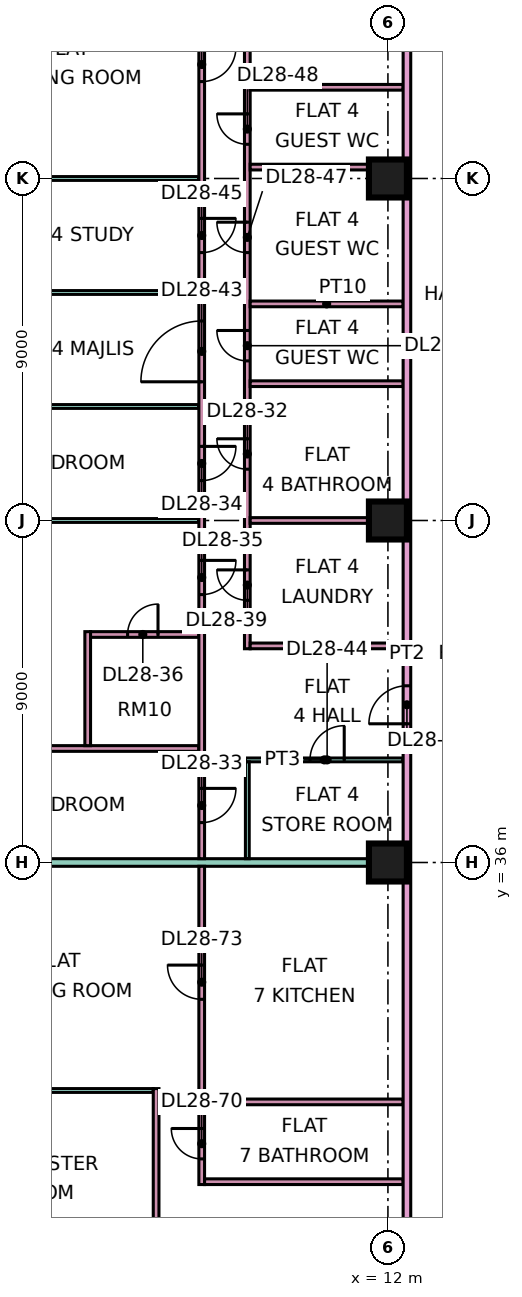
"""IFC4 building model, lengths in metres.
Left out: names, types, materials, properties, quantities, classifications, styles, units other than length and angle.
Written with IfcOpenShell. Run it as: python <this file> out.ifc"""

import sys

from ifc_helpers import new_model, si_unit, direction, frame, frame_2d, origin, origin_2d, place, context, subcontext, project, spatial, rectangle, extrude, element, fill, save


model = new_model("IFC4")
c1 = context("Model", 3, precision=1e-05, world=origin(), true_north=direction((0.0, 1.0)))
c2 = subcontext(c1, "Body", "Model", "MODEL_VIEW")
j1 = project(units=[si_unit("LENGTHUNIT", "METRE"), si_unit("PLANEANGLEUNIT", "RADIAN")], contexts=[c1])
p1 = place(None, origin())
s1 = spatial("IfcSite", under=j1, at=p1, CompositionType="ELEMENT")
p2 = place(p1, origin())
s2 = spatial("IfcBuilding", under=s1, at=p2, CompositionType="ELEMENT")
p3 = place(p2, frame((0.0, 0.0, 121.9)))
s3 = spatial("IfcBuildingStorey", under=s2, at=p3, CompositionType="ELEMENT", Elevation=121.9)
for number, where, z_axis, x_axis in (
    (1, (12.0, 36.0, 0.0), (0.0, 0.0, 1.0), (1.0, 0.0, 0.0)),
    (2, (12.0, 45.0, 0.0), (0.0, 0.0, 1.0), (1.0, 0.0, 0.0)),
    (3, (12.0, 54.0, 0.0), (0.0, 0.0, 1.0), (1.0, 0.0, 0.0)),
):
    element("IfcColumn", number, at=place(p3, frame(where, z_axis=z_axis, x_axis=x_axis)), inside=s3, PredefinedType="COLUMN", context=c2, shape_type="SweptSolid", body=[
        extrude(rectangle(XDim=1.0, YDim=1.0, at=origin_2d()), origin(), (0.0, 0.0, 1.0), 3.75),
    ])
p4 = place(p3, frame((-1.351, 39.0, 0.0), z_axis=(0.0, 0.0, 1.0), x_axis=(1.0, 0.0, 0.0)))
e4 = element("IfcWall", 4, at=p4, inside=s3, PredefinedType="PARTITIONING", context=c2, shape_type="SweptSolid", body=[
    extrude(rectangle(XDim=8.376, YDim=0.15, at=frame_2d((4.188, 0.0))), origin(), (0.0, 0.0, 1.0), 3.35),
])
p5 = place(p3, frame((-1.351, 45.0, 0.0), z_axis=(0.0, 0.0, 1.0), x_axis=(1.0, 0.0, 0.0)))
e5 = element("IfcWall", 5, at=p5, inside=s3, PredefinedType="PARTITIONING", context=c2, shape_type="SweptSolid", body=[
    extrude(rectangle(XDim=8.376, YDim=0.1, at=frame_2d((4.188, 0.0))), origin(), (0.0, 0.0, 1.0), 3.35),
])
p6 = place(p3, frame((0.0, 36.0, 0.0), z_axis=(0.0, 0.0, 1.0), x_axis=(1.0, 0.0, 0.0)))
e6 = element("IfcWall", 6, at=p6, inside=s3, PredefinedType="PARTITIONING", context=c2, shape_type="SweptSolid", body=[
    extrude(rectangle(XDim=12.4, YDim=0.2, at=frame_2d((6.2, 0.0))), origin(), (0.0, 0.0, 1.0), 3.35),
])
p7 = place(p3, frame((0.0, 48.0, 0.0), z_axis=(0.0, 0.0, 1.0), x_axis=(1.0, 0.0, 0.0)))
e7 = element("IfcWall", 7, at=p7, inside=s3, PredefinedType="PARTITIONING", context=c2, shape_type="SweptSolid", body=[
    extrude(rectangle(XDim=7.025, YDim=0.1, at=frame_2d((3.512, 0.0))), origin(), (0.0, 0.0, 1.0), 3.35),
])
p8 = place(p3, frame((0.074, 30.0, 0.0), z_axis=(0.0, 0.0, 1.0), x_axis=(1.0, 0.0, 0.0)))
e8 = element("IfcWall", 8, at=p8, inside=s3, PredefinedType="PARTITIONING", context=c2, shape_type="SweptSolid", body=[
    extrude(rectangle(XDim=5.751, YDim=0.1, at=frame_2d((2.875, 0.0))), origin(), (0.0, 0.0, 1.0), 3.35),
])
p9 = place(p8, frame((1.126, 0.0, 0.0)))
e9 = element("IfcOpeningElement", 9, at=p9, cuts=e8, PredefinedType="OPENING", context=c2, shape_type="SweptSolid", body=[
    extrude(rectangle(XDim=0.9, YDim=2.1, at=frame_2d((0.45, 1.05))), frame((0.0, 0.06, 0.0), z_axis=(0.0, -1.0, 0.0), x_axis=(1.0, 0.0, 0.0)), (0.0, 0.0, 1.0), 0.12),
])
for number, where, z_axis, x_axis in (
    (10, (0.074, 51.0, 0.0), (0.0, 0.0, 1.0), (1.0, 0.0, 0.0)),
    (11, (0.074, 54.0, 0.0), (0.0, 0.0, 1.0), (1.0, 0.0, 0.0)),
):
    element("IfcWall", number, at=place(p3, frame(where, z_axis=z_axis, x_axis=x_axis)), inside=s3, PredefinedType="PARTITIONING", context=c2, shape_type="SweptSolid", body=[
        extrude(rectangle(XDim=6.951, YDim=0.1, at=frame_2d((3.476, 0.0))), origin(), (0.0, 0.0, 1.0), 3.35),
    ])
p10 = place(p3, frame((4.1, 39.075, 0.0), z_axis=(0.0, 0.0, 1.0), x_axis=(0.0, 1.0, 0.0)))
e12 = element("IfcWall", 12, at=p10, inside=s3, PredefinedType="PARTITIONING", context=c2, shape_type="SweptSolid", body=[
    extrude(rectangle(XDim=3.0, YDim=0.15, at=frame_2d((1.5, 0.0))), origin(), (0.0, 0.0, 1.0), 3.35),
])
p11 = place(p3, frame((4.175, 42.0, 0.0), z_axis=(0.0, 0.0, 1.0), x_axis=(1.0, 0.0, 0.0)))
e13 = element("IfcWall", 13, at=p11, inside=s3, PredefinedType="PARTITIONING", context=c2, shape_type="SweptSolid", body=[
    extrude(rectangle(XDim=2.85, YDim=0.15, at=frame_2d((1.425, 0.0))), origin(), (0.0, 0.0, 1.0), 3.35),
])
p12 = place(p11, frame((0.975, 0.0, 0.0)))
e14 = element("IfcOpeningElement", 14, at=p12, cuts=e13, PredefinedType="OPENING", context=c2, shape_type="SweptSolid", body=[
    extrude(rectangle(XDim=0.8, YDim=2.1, at=frame_2d((0.4, 1.05))), frame((0.0, 0.085, 0.0), z_axis=(0.0, -1.0, 0.0), x_axis=(1.0, 0.0, 0.0)), (0.0, 0.0, 1.0), 0.17),
])
p13 = place(p3, frame((5.9, 22.5, 0.0), z_axis=(0.0, 0.0, 1.0), x_axis=(0.0, 1.0, 0.0)))
e15 = element("IfcWall", 15, at=p13, inside=s3, PredefinedType="PARTITIONING", context=c2, shape_type="SweptSolid", body=[
    extrude(rectangle(XDim=7.55, YDim=0.15, at=frame_2d((3.775, 0.0))), origin(), (0.0, 0.0, 1.0), 3.35),
])
p14 = place(p3, frame((7.1, 27.525, 0.0), z_axis=(0.0, 0.0, 1.0), x_axis=(0.0, 1.0, 0.0)))
e16 = element("IfcWall", 16, at=p14, inside=s3, PredefinedType="PARTITIONING", context=c2, shape_type="SweptSolid", body=[
    extrude(rectangle(XDim=8.375, YDim=0.15, at=frame_2d((4.188, 0.0))), origin(), (0.0, 0.0, 1.0), 3.35),
])
p15 = place(p14, frame((0.675, 0.0, 0.0)))
e17 = element("IfcOpeningElement", 17, at=p15, cuts=e16, PredefinedType="OPENING", context=c2, shape_type="SweptSolid", body=[
    extrude(rectangle(XDim=0.8, YDim=2.1, at=frame_2d((0.4, 1.05))), frame((0.0, 0.085, 0.0), z_axis=(0.0, -1.0, 0.0), x_axis=(1.0, 0.0, 0.0)), (0.0, 0.0, 1.0), 0.17),
])
p16 = place(p14, frame((4.875, 0.0, 0.0)))
e18 = element("IfcOpeningElement", 18, at=p16, cuts=e16, PredefinedType="OPENING", context=c2, shape_type="SweptSolid", body=[
    extrude(rectangle(XDim=0.9, YDim=2.1, at=frame_2d((0.45, 1.05))), frame((0.0, 0.085, 0.0), z_axis=(0.0, -1.0, 0.0), x_axis=(1.0, 0.0, 0.0)), (0.0, 0.0, 1.0), 0.17),
])
p17 = place(p3, frame((7.1, 36.1, 0.0), z_axis=(0.0, 0.0, 1.0), x_axis=(0.0, 1.0, 0.0)))
e19 = element("IfcWall", 19, at=p17, inside=s3, PredefinedType="PARTITIONING", context=c2, shape_type="SweptSolid", body=[
    extrude(rectangle(XDim=26.826, YDim=0.15, at=frame_2d((13.413, 0.0))), origin(), (0.0, 0.0, 1.0), 3.35),
])
p18 = place(p17, frame((0.95, 0.0, 0.0)))
e20 = element("IfcOpeningElement", 20, at=p18, cuts=e19, PredefinedType="OPENING", context=c2, shape_type="SweptSolid", body=[
    extrude(rectangle(XDim=0.9, YDim=2.1, at=frame_2d((0.45, 1.05))), frame((0.0, 0.085, 0.0), z_axis=(0.0, -1.0, 0.0), x_axis=(1.0, 0.0, 0.0)), (0.0, 0.0, 1.0), 0.17),
])
p19 = place(p17, frame((9.95, 0.0, 0.0)))
e21 = element("IfcOpeningElement", 21, at=p19, cuts=e19, PredefinedType="OPENING", context=c2, shape_type="SweptSolid", body=[
    extrude(rectangle(XDim=0.9, YDim=2.1, at=frame_2d((0.45, 1.05))), frame((0.0, 0.085, 0.0), z_axis=(0.0, -1.0, 0.0), x_axis=(1.0, 0.0, 0.0)), (0.0, 0.0, 1.0), 0.17),
])
p20 = place(p17, frame((6.95, 0.0, 0.0)))
e22 = element("IfcOpeningElement", 22, at=p20, cuts=e19, PredefinedType="OPENING", context=c2, shape_type="SweptSolid", body=[
    extrude(rectangle(XDim=0.9, YDim=2.1, at=frame_2d((0.45, 1.05))), frame((0.0, 0.085, 0.0), z_axis=(0.0, -1.0, 0.0), x_axis=(1.0, 0.0, 0.0)), (0.0, 0.0, 1.0), 0.17),
])
p21 = place(p17, frame((20.45, 0.0, 0.0)))
e23 = element("IfcOpeningElement", 23, at=p21, cuts=e19, PredefinedType="OPENING", context=c2, shape_type="SweptSolid", body=[
    extrude(rectangle(XDim=0.9, YDim=2.1, at=frame_2d((0.45, 1.05))), frame((0.0, 0.085, 0.0), z_axis=(0.0, -1.0, 0.0), x_axis=(1.0, 0.0, 0.0)), (0.0, 0.0, 1.0), 0.17),
])
p22 = place(p17, frame((25.8, 0.0, 0.0)))
e24 = element("IfcOpeningElement", 24, at=p22, cuts=e19, PredefinedType="OPENING", context=c2, shape_type="SweptSolid", body=[
    extrude(rectangle(XDim=0.8, YDim=2.1, at=frame_2d((0.4, 1.05))), frame((0.0, 0.085, 0.0), z_axis=(0.0, -1.0, 0.0), x_axis=(1.0, 0.0, 0.0)), (0.0, 0.0, 1.0), 0.17),
])
p23 = place(p17, frame((12.55, 0.0, 0.0)))
e25 = element("IfcOpeningElement", 25, at=p23, cuts=e19, PredefinedType="OPENING", context=c2, shape_type="SweptSolid", body=[
    extrude(rectangle(XDim=1.6, YDim=2.1, at=frame_2d((0.8, 1.05))), frame((0.0, 0.085, 0.0), z_axis=(0.0, -1.0, 0.0), x_axis=(1.0, 0.0, 0.0)), (0.0, 0.0, 1.0), 0.17),
])
p24 = place(p17, frame((15.95, 0.0, 0.0)))
e26 = element("IfcOpeningElement", 26, at=p24, cuts=e19, PredefinedType="OPENING", context=c2, shape_type="SweptSolid", body=[
    extrude(rectangle(XDim=0.9, YDim=2.1, at=frame_2d((0.45, 1.05))), frame((0.0, 0.085, 0.0), z_axis=(0.0, -1.0, 0.0), x_axis=(1.0, 0.0, 0.0)), (0.0, 0.0, 1.0), 0.17),
])
for number, where, z_axis, x_axis in (
    (27, (7.175, 27.6, 0.0), (0.0, 0.0, 1.0), (1.0, 0.0, 0.0)),
    (28, (7.175, 29.7, 0.0), (0.0, 0.0, 1.0), (1.0, 0.0, 0.0)),
):
    element("IfcWall", number, at=place(p3, frame(where, z_axis=z_axis, x_axis=x_axis)), inside=s3, PredefinedType="PARTITIONING", context=c2, shape_type="SweptSolid", body=[
        extrude(rectangle(XDim=5.225, YDim=0.15, at=frame_2d((2.612, 0.0))), origin(), (0.0, 0.0, 1.0), 3.35),
    ])
p25 = place(p3, frame((8.25, 38.7, 0.0), z_axis=(0.0, 0.0, 1.0), x_axis=(1.0, 0.0, 0.0)))
e29 = element("IfcWall", 29, at=p25, inside=s3, PredefinedType="PARTITIONING", context=c2, shape_type="SweptSolid", body=[
    extrude(rectangle(XDim=4.15, YDim=0.1, at=frame_2d((2.075, 0.0))), origin(), (0.0, 0.0, 1.0), 3.35),
])
p26 = place(p25, frame((1.7, 0.0, 0.0)))
e30 = element("IfcOpeningElement", 30, at=p26, cuts=e29, PredefinedType="OPENING", context=c2, shape_type="SweptSolid", body=[
    extrude(rectangle(XDim=0.9, YDim=2.1, at=frame_2d((0.45, 1.05))), frame((0.0, 0.06, 0.0), z_axis=(0.0, -1.0, 0.0), x_axis=(1.0, 0.0, 0.0)), (0.0, 0.0, 1.0), 0.12),
])
p27 = place(p3, frame((8.3, 36.1, 0.0), z_axis=(0.0, 0.0, 1.0), x_axis=(0.0, 1.0, 0.0)))
e31 = element("IfcWall", 31, at=p27, inside=s3, PredefinedType="PARTITIONING", context=c2, shape_type="SweptSolid", body=[
    extrude(rectangle(XDim=2.55, YDim=0.1, at=frame_2d((1.275, 0.0))), origin(), (0.0, 0.0, 1.0), 3.35),
])
p28 = place(p3, frame((8.3, 41.625, 0.0), z_axis=(0.0, 0.0, 1.0), x_axis=(0.0, 1.0, 0.0)))
e32 = element("IfcWall", 32, at=p28, inside=s3, PredefinedType="PARTITIONING", context=c2, shape_type="SweptSolid", body=[
    extrude(rectangle(XDim=21.301, YDim=0.15, at=frame_2d((10.65, 0.0))), origin(), (0.0, 0.0, 1.0), 3.35),
])
p29 = place(p28, frame((4.725, 0.0, 0.0)))
e33 = element("IfcOpeningElement", 33, at=p29, cuts=e32, PredefinedType="OPENING", context=c2, shape_type="SweptSolid", body=[
    extrude(rectangle(XDim=0.8, YDim=2.1, at=frame_2d((0.4, 1.05))), frame((0.0, 0.085, 0.0), z_axis=(0.0, -1.0, 0.0), x_axis=(1.0, 0.0, 0.0)), (0.0, 0.0, 1.0), 0.17),
])
p30 = place(p28, frame((17.625, 0.0, 0.0)))
e34 = element("IfcOpeningElement", 34, at=p30, cuts=e32, PredefinedType="OPENING", context=c2, shape_type="SweptSolid", body=[
    extrude(rectangle(XDim=0.9, YDim=2.1, at=frame_2d((0.45, 1.05))), frame((0.0, 0.085, 0.0), z_axis=(0.0, -1.0, 0.0), x_axis=(1.0, 0.0, 0.0)), (0.0, 0.0, 1.0), 0.17),
])
p31 = place(p28, frame((1.275, 0.0, 0.0)))
e35 = element("IfcOpeningElement", 35, at=p31, cuts=e32, PredefinedType="OPENING", context=c2, shape_type="SweptSolid", body=[
    extrude(rectangle(XDim=0.8, YDim=2.1, at=frame_2d((0.4, 1.05))), frame((0.0, 0.085, 0.0), z_axis=(0.0, -1.0, 0.0), x_axis=(1.0, 0.0, 0.0)), (0.0, 0.0, 1.0), 0.17),
])
p32 = place(p28, frame((7.575, 0.0, 0.0)))
e36 = element("IfcOpeningElement", 36, at=p32, cuts=e32, PredefinedType="OPENING", context=c2, shape_type="SweptSolid", body=[
    extrude(rectangle(XDim=0.8, YDim=2.1, at=frame_2d((0.4, 1.05))), frame((0.0, 0.085, 0.0), z_axis=(0.0, -1.0, 0.0), x_axis=(1.0, 0.0, 0.0)), (0.0, 0.0, 1.0), 0.17),
])
p33 = place(p28, frame((10.425, 0.0, 0.0)))
e37 = element("IfcOpeningElement", 37, at=p33, cuts=e32, PredefinedType="OPENING", context=c2, shape_type="SweptSolid", body=[
    extrude(rectangle(XDim=0.8, YDim=2.1, at=frame_2d((0.4, 1.05))), frame((0.0, 0.085, 0.0), z_axis=(0.0, -1.0, 0.0), x_axis=(1.0, 0.0, 0.0)), (0.0, 0.0, 1.0), 0.17),
])
p34 = place(p28, frame((13.275, 0.0, 0.0)))
e38 = element("IfcOpeningElement", 38, at=p34, cuts=e32, PredefinedType="OPENING", context=c2, shape_type="SweptSolid", body=[
    extrude(rectangle(XDim=0.8, YDim=2.1, at=frame_2d((0.4, 1.05))), frame((0.0, 0.085, 0.0), z_axis=(0.0, -1.0, 0.0), x_axis=(1.0, 0.0, 0.0)), (0.0, 0.0, 1.0), 0.17),
])
for number, where, z_axis, x_axis in (
    (39, (8.375, 41.7, 0.0), (0.0, 0.0, 1.0), (1.0, 0.0, 0.0)),
    (40, (8.375, 45.0, 0.0), (0.0, 0.0, 1.0), (1.0, 0.0, 0.0)),
    (41, (8.375, 48.6, 0.0), (0.0, 0.0, 1.0), (1.0, 0.0, 0.0)),
    (42, (8.375, 50.7, 0.0), (0.0, 0.0, 1.0), (1.0, 0.0, 0.0)),
    (43, (8.375, 54.3, 0.0), (0.0, 0.0, 1.0), (1.0, 0.0, 0.0)),
    (44, (8.375, 56.4, 0.0), (0.0, 0.0, 1.0), (1.0, 0.0, 0.0)),
):
    element("IfcWall", number, at=place(p3, frame(where, z_axis=z_axis, x_axis=x_axis)), inside=s3, PredefinedType="PARTITIONING", context=c2, shape_type="SweptSolid", body=[
        extrude(rectangle(XDim=4.025, YDim=0.15, at=frame_2d((2.012, 0.0))), origin(), (0.0, 0.0, 1.0), 3.35),
    ])
p35 = place(p3, frame((12.5, 20.0, 0.0), z_axis=(0.0, 0.0, 1.0), x_axis=(0.0, 1.0, 0.0)))
e45 = element("IfcWall", 45, at=p35, inside=s3, PredefinedType="PARTITIONING", context=c2, shape_type="SweptSolid", body=[
    extrude(rectangle(XDim=43.0, YDim=0.2, at=frame_2d((21.5, 0.0))), origin(), (0.0, 0.0, 1.0), 3.35),
])
p36 = place(p35, frame((19.65, 0.0, 0.0)))
e46 = element("IfcOpeningElement", 46, at=p36, cuts=e45, PredefinedType="OPENING", context=c2, shape_type="SweptSolid", body=[
    extrude(rectangle(XDim=1.0, YDim=2.1, at=frame_2d((0.5, 1.05))), frame((0.0, 0.11, 0.0), z_axis=(0.0, -1.0, 0.0), x_axis=(1.0, 0.0, 0.0)), (0.0, 0.0, 1.0), 0.22),
])
p37 = place(p35, frame((0.6, 0.0, 0.0)))
e47 = element("IfcOpeningElement", 47, at=p37, cuts=e45, PredefinedType="OPENING", context=c2, shape_type="SweptSolid", body=[
    extrude(rectangle(XDim=1.2, YDim=2.1, at=frame_2d((0.6, 1.05))), frame((0.0, 0.11, 0.0), z_axis=(0.0, -1.0, 0.0), x_axis=(1.0, 0.0, 0.0)), (0.0, 0.0, 1.0), 0.22),
])
p38 = place(p35, frame((4.5, 0.0, 0.0)))
e48 = element("IfcOpeningElement", 48, at=p38, cuts=e45, PredefinedType="OPENING", context=c2, shape_type="SweptSolid", body=[
    extrude(rectangle(XDim=1.0, YDim=2.1, at=frame_2d((0.5, 1.05))), frame((0.0, 0.11, 0.0), z_axis=(0.0, -1.0, 0.0), x_axis=(1.0, 0.0, 0.0)), (0.0, 0.0, 1.0), 0.22),
])
p39 = place(p29, frame((0.8, 0.0, 0.0), z_axis=(0.0, 0.0, 1.0), x_axis=(-1.0, 0.0, 0.0)))
e49 = element("IfcDoor", 49, at=p39, inside=s3, OperationType="SINGLE_SWING_RIGHT", PredefinedType="DOOR", context=c2, shape_type="SweptSolid", body=[
    extrude(rectangle(XDim=0.8, YDim=2.1, at=frame_2d((0.4, 1.05))), frame((0.0, 0.025, 0.0), z_axis=(0.0, -1.0, 0.0), x_axis=(1.0, 0.0, 0.0)), (0.0, 0.0, 1.0), 0.05),
])
fill(e33, e49)
p40 = place(p18, origin())
e50 = element("IfcDoor", 50, at=p40, inside=s3, OperationType="SINGLE_SWING_RIGHT", PredefinedType="DOOR", context=c2, shape_type="SweptSolid", body=[
    extrude(rectangle(XDim=0.9, YDim=2.1, at=frame_2d((0.45, 1.05))), frame((0.0, 0.025, 0.0), z_axis=(0.0, -1.0, 0.0), x_axis=(1.0, 0.0, 0.0)), (0.0, 0.0, 1.0), 0.05),
])
fill(e20, e50)
p41 = place(p19, origin())
e51 = element("IfcDoor", 51, at=p41, inside=s3, OperationType="SINGLE_SWING_RIGHT", PredefinedType="DOOR", context=c2, shape_type="SweptSolid", body=[
    extrude(rectangle(XDim=0.9, YDim=2.1, at=frame_2d((0.45, 1.05))), frame((0.0, 0.025, 0.0), z_axis=(0.0, -1.0, 0.0), x_axis=(1.0, 0.0, 0.0)), (0.0, 0.0, 1.0), 0.05),
])
fill(e21, e51)
p42 = place(p20, origin())
e52 = element("IfcDoor", 52, at=p42, inside=s3, OperationType="SINGLE_SWING_RIGHT", PredefinedType="DOOR", context=c2, shape_type="SweptSolid", body=[
    extrude(rectangle(XDim=0.9, YDim=2.1, at=frame_2d((0.45, 1.05))), frame((0.0, 0.025, 0.0), z_axis=(0.0, -1.0, 0.0), x_axis=(1.0, 0.0, 0.0)), (0.0, 0.0, 1.0), 0.05),
])
fill(e22, e52)
p43 = place(p12, frame((0.8, 0.0, 0.0), z_axis=(0.0, 0.0, 1.0), x_axis=(-1.0, 0.0, 0.0)))
e53 = element("IfcDoor", 53, at=p43, inside=s3, OperationType="SINGLE_SWING_RIGHT", PredefinedType="DOOR", context=c2, shape_type="SweptSolid", body=[
    extrude(rectangle(XDim=0.8, YDim=2.1, at=frame_2d((0.4, 1.05))), frame((0.0, 0.025, 0.0), z_axis=(0.0, -1.0, 0.0), x_axis=(1.0, 0.0, 0.0)), (0.0, 0.0, 1.0), 0.05),
])
fill(e14, e53)
p44 = place(p36, origin())
e54 = element("IfcDoor", 54, at=p44, inside=s3, OperationType="SINGLE_SWING_LEFT", PredefinedType="DOOR", context=c2, shape_type="SweptSolid", body=[
    extrude(rectangle(XDim=1.0, YDim=2.1, at=frame_2d((0.5, 1.05))), frame((0.0, 0.025, 0.0), z_axis=(0.0, -1.0, 0.0), x_axis=(1.0, 0.0, 0.0)), (0.0, 0.0, 1.0), 0.05),
])
fill(e46, e54)
p45 = place(p31, frame((0.8, 0.0, 0.0), z_axis=(0.0, 0.0, 1.0), x_axis=(-1.0, 0.0, 0.0)))
e55 = element("IfcDoor", 55, at=p45, inside=s3, OperationType="SINGLE_SWING_RIGHT", PredefinedType="DOOR", context=c2, shape_type="SweptSolid", body=[
    extrude(rectangle(XDim=0.8, YDim=2.1, at=frame_2d((0.4, 1.05))), frame((0.0, 0.025, 0.0), z_axis=(0.0, -1.0, 0.0), x_axis=(1.0, 0.0, 0.0)), (0.0, 0.0, 1.0), 0.05),
])
fill(e35, e55)
p46 = place(p21, origin())
e56 = element("IfcDoor", 56, at=p46, inside=s3, OperationType="SINGLE_SWING_RIGHT", PredefinedType="DOOR", context=c2, shape_type="SweptSolid", body=[
    extrude(rectangle(XDim=0.9, YDim=2.1, at=frame_2d((0.45, 1.05))), frame((0.0, 0.025, 0.0), z_axis=(0.0, -1.0, 0.0), x_axis=(1.0, 0.0, 0.0)), (0.0, 0.0, 1.0), 0.05),
])
fill(e23, e56)
p47 = place(p23, origin())
e57 = element("IfcDoor", 57, at=p47, inside=s3, OperationType="DOUBLE_DOOR_SINGLE_SWING", PredefinedType="DOOR", context=c2, shape_type="SweptSolid", body=[
    extrude(rectangle(XDim=1.6, YDim=2.1, at=frame_2d((0.8, 1.05))), frame((0.0, 0.025, 0.0), z_axis=(0.0, -1.0, 0.0), x_axis=(1.0, 0.0, 0.0)), (0.0, 0.0, 1.0), 0.05),
])
fill(e25, e57)
p48 = place(p26, frame((0.9, 0.0, 0.0), z_axis=(0.0, 0.0, 1.0), x_axis=(-1.0, 0.0, 0.0)))
e58 = element("IfcDoor", 58, at=p48, inside=s3, OperationType="SINGLE_SWING_RIGHT", PredefinedType="DOOR", context=c2, shape_type="SweptSolid", body=[
    extrude(rectangle(XDim=0.9, YDim=2.1, at=frame_2d((0.45, 1.05))), frame((0.0, 0.025, 0.0), z_axis=(0.0, -1.0, 0.0), x_axis=(1.0, 0.0, 0.0)), (0.0, 0.0, 1.0), 0.05),
])
fill(e30, e58)
p49 = place(p24, origin())
e59 = element("IfcDoor", 59, at=p49, inside=s3, OperationType="SINGLE_SWING_RIGHT", PredefinedType="DOOR", context=c2, shape_type="SweptSolid", body=[
    extrude(rectangle(XDim=0.9, YDim=2.1, at=frame_2d((0.45, 1.05))), frame((0.0, 0.025, 0.0), z_axis=(0.0, -1.0, 0.0), x_axis=(1.0, 0.0, 0.0)), (0.0, 0.0, 1.0), 0.05),
])
fill(e26, e59)
p50 = place(p32, frame((0.8, 0.0, 0.0), z_axis=(0.0, 0.0, 1.0), x_axis=(-1.0, 0.0, 0.0)))
e60 = element("IfcDoor", 60, at=p50, inside=s3, OperationType="SINGLE_SWING_RIGHT", PredefinedType="DOOR", context=c2, shape_type="SweptSolid", body=[
    extrude(rectangle(XDim=0.8, YDim=2.1, at=frame_2d((0.4, 1.05))), frame((0.0, 0.025, 0.0), z_axis=(0.0, -1.0, 0.0), x_axis=(1.0, 0.0, 0.0)), (0.0, 0.0, 1.0), 0.05),
])
fill(e36, e60)
p51 = place(p33, frame((0.8, 0.0, 0.0), z_axis=(0.0, 0.0, 1.0), x_axis=(-1.0, 0.0, 0.0)))
e61 = element("IfcDoor", 61, at=p51, inside=s3, OperationType="SINGLE_SWING_RIGHT", PredefinedType="DOOR", context=c2, shape_type="SweptSolid", body=[
    extrude(rectangle(XDim=0.8, YDim=2.1, at=frame_2d((0.4, 1.05))), frame((0.0, 0.025, 0.0), z_axis=(0.0, -1.0, 0.0), x_axis=(1.0, 0.0, 0.0)), (0.0, 0.0, 1.0), 0.05),
])
fill(e37, e61)
p52 = place(p34, frame((0.8, 0.0, 0.0), z_axis=(0.0, 0.0, 1.0), x_axis=(-1.0, 0.0, 0.0)))
e62 = element("IfcDoor", 62, at=p52, inside=s3, OperationType="SINGLE_SWING_RIGHT", PredefinedType="DOOR", context=c2, shape_type="SweptSolid", body=[
    extrude(rectangle(XDim=0.8, YDim=2.1, at=frame_2d((0.4, 1.05))), frame((0.0, 0.025, 0.0), z_axis=(0.0, -1.0, 0.0), x_axis=(1.0, 0.0, 0.0)), (0.0, 0.0, 1.0), 0.05),
])
fill(e38, e62)
p53 = place(p15, frame((0.8, 0.0, 0.0), z_axis=(0.0, 0.0, 1.0), x_axis=(-1.0, 0.0, 0.0)))
e63 = element("IfcDoor", 63, at=p53, inside=s3, OperationType="SINGLE_SWING_RIGHT", PredefinedType="DOOR", context=c2, shape_type="SweptSolid", body=[
    extrude(rectangle(XDim=0.8, YDim=2.1, at=frame_2d((0.4, 1.05))), frame((0.0, 0.025, 0.0), z_axis=(0.0, -1.0, 0.0), x_axis=(1.0, 0.0, 0.0)), (0.0, 0.0, 1.0), 0.05),
])
fill(e17, e63)
p54 = place(p16, frame((0.9, 0.0, 0.0), z_axis=(0.0, 0.0, 1.0), x_axis=(-1.0, 0.0, 0.0)))
e64 = element("IfcDoor", 64, at=p54, inside=s3, OperationType="SINGLE_SWING_RIGHT", PredefinedType="DOOR", context=c2, shape_type="SweptSolid", body=[
    extrude(rectangle(XDim=0.9, YDim=2.1, at=frame_2d((0.45, 1.05))), frame((0.0, 0.025, 0.0), z_axis=(0.0, -1.0, 0.0), x_axis=(1.0, 0.0, 0.0)), (0.0, 0.0, 1.0), 0.05),
])
fill(e18, e64)
save(model, sys.argv[1])
